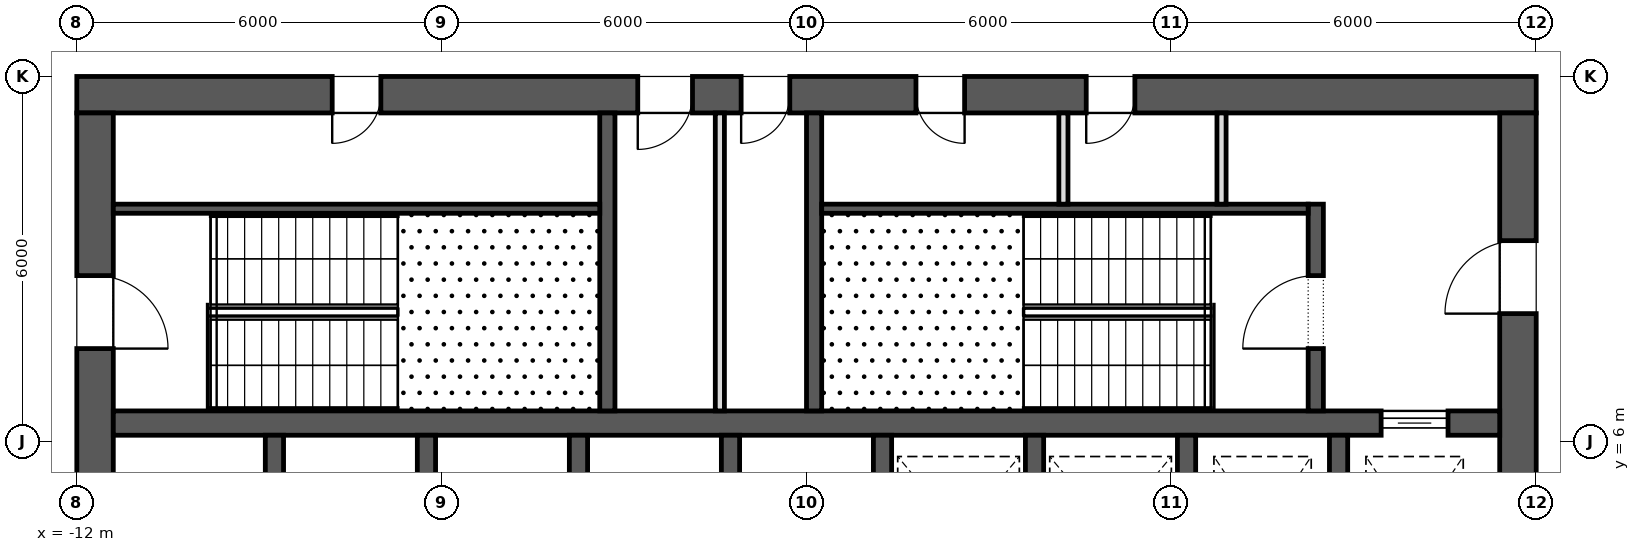
"""IFC4 building model, lengths in metres.
Left out: names, types, materials, properties, quantities, classifications, styles, units other than length and angle.
Written with IfcOpenShell. Run it as: python <this file> out.ifc"""

import sys

from ifc_helpers import new_model, si_unit, direction, frame, frame_2d, origin, place, context, subcontext, project, spatial, rectangle, extrude, element, fill, save


model = new_model("IFC4")
c1 = context("Model", 3, precision=1e-05, world=origin(), true_north=direction((0.0, 1.0)))
c2 = subcontext(c1, "Body", "Model", "MODEL_VIEW")
j1 = project(units=[si_unit("LENGTHUNIT", "METRE"), si_unit("PLANEANGLEUNIT", "RADIAN")], contexts=[c1])
p1 = place(None, origin())
s1 = spatial("IfcSite", under=j1, at=p1, CompositionType="ELEMENT")
p2 = place(p1, origin())
s2 = spatial("IfcBuilding", under=s1, at=p2, CompositionType="ELEMENT")
p3 = place(p2, frame((0.0, 0.0, 61.3)))
s3 = spatial("IfcBuildingStorey", under=s2, at=p3, CompositionType="ELEMENT", Elevation=61.3)
p4 = place(p3, frame((-12.0, 11.7, 0.0), z_axis=(0.0, 0.0, 1.0), x_axis=(1.0, 0.0, 0.0)))
e1 = element("IfcWall", 1, at=p4, inside=s3, PredefinedType="SHEAR", context=c2, shape_type="SweptSolid", body=[
    extrude(rectangle(XDim=24.0, YDim=0.6, at=frame_2d((12.0, 0.0))), origin(), (0.0, 0.0, 1.0), 4.2),
])
p5 = place(p4, frame((9.225, 0.0, 0.0)))
e2 = element("IfcOpeningElement", 2, at=p5, cuts=e1, PredefinedType="OPENING", context=c2, shape_type="SweptSolid", body=[
    extrude(rectangle(XDim=0.9, YDim=2.1, at=frame_2d((0.45, 1.05))), frame((0.0, 0.312, 0.0), z_axis=(0.0, -1.0, 0.0), x_axis=(1.0, 0.0, 0.0)), (0.0, 0.0, 1.0), 0.624),
])
p6 = place(p4, frame((10.925, 0.0, 0.0)))
e3 = element("IfcOpeningElement", 3, at=p6, cuts=e1, PredefinedType="OPENING", context=c2, shape_type="SweptSolid", body=[
    extrude(rectangle(XDim=0.8, YDim=2.1, at=frame_2d((0.4, 1.05))), frame((0.0, 0.312, 0.0), z_axis=(0.0, -1.0, 0.0), x_axis=(1.0, 0.0, 0.0)), (0.0, 0.0, 1.0), 0.624),
])
p7 = place(p4, frame((4.2, 0.0, 0.0)))
e4 = element("IfcOpeningElement", 4, at=p7, cuts=e1, PredefinedType="OPENING", context=c2, shape_type="SweptSolid", body=[
    extrude(rectangle(XDim=0.8, YDim=2.1, at=frame_2d((0.4, 1.05))), frame((0.0, 0.312, 0.0), z_axis=(0.0, -1.0, 0.0), x_axis=(1.0, 0.0, 0.0)), (0.0, 0.0, 1.0), 0.624),
])
p8 = place(p4, frame((13.8, 0.0, 0.0)))
e5 = element("IfcOpeningElement", 5, at=p8, cuts=e1, PredefinedType="OPENING", context=c2, shape_type="SweptSolid", body=[
    extrude(rectangle(XDim=0.8, YDim=2.1, at=frame_2d((0.4, 1.05))), frame((0.0, 0.312, 0.0), z_axis=(0.0, -1.0, 0.0), x_axis=(1.0, 0.0, 0.0)), (0.0, 0.0, 1.0), 0.624),
])
p9 = place(p4, frame((16.6, 0.0, 0.0)))
e6 = element("IfcOpeningElement", 6, at=p9, cuts=e1, PredefinedType="OPENING", context=c2, shape_type="SweptSolid", body=[
    extrude(rectangle(XDim=0.8, YDim=2.1, at=frame_2d((0.4, 1.05))), frame((0.0, 0.312, 0.0), z_axis=(0.0, -1.0, 0.0), x_axis=(1.0, 0.0, 0.0)), (0.0, 0.0, 1.0), 0.624),
])
p10 = place(p3, frame((11.7, -11.4, 0.0), z_axis=(0.0, 0.0, 1.0), x_axis=(0.0, 1.0, 0.0)))
e7 = element("IfcWall", 7, at=p10, inside=s3, PredefinedType="SHEAR", context=c2, shape_type="SweptSolid", body=[
    extrude(rectangle(XDim=22.8, YDim=0.6, at=frame_2d((11.4, 0.0))), origin(), (0.0, 0.0, 1.0), 4.2),
])
p11 = place(p10, frame((10.2, 0.0, 0.0)))
e8 = element("IfcOpeningElement", 8, at=p11, cuts=e7, PredefinedType="OPENING", context=c2, shape_type="SweptSolid", body=[
    extrude(rectangle(XDim=2.4, YDim=2.1, at=frame_2d((1.2, 1.05))), frame((0.0, 0.312, 0.0), z_axis=(0.0, -1.0, 0.0), x_axis=(1.0, 0.0, 0.0)), (0.0, 0.0, 1.0), 0.624),
])
p12 = place(p10, frame((19.5, 0.0, 0.0)))
e9 = element("IfcOpeningElement", 9, at=p12, cuts=e7, PredefinedType="OPENING", context=c2, shape_type="SweptSolid", body=[
    extrude(rectangle(XDim=1.2, YDim=2.1, at=frame_2d((0.6, 1.05))), frame((0.0, 0.312, 0.0), z_axis=(0.0, -1.0, 0.0), x_axis=(1.0, 0.0, 0.0)), (0.0, 0.0, 1.0), 0.624),
])
p13 = place(p10, frame((2.1, 0.0, 0.0)))
e10 = element("IfcOpeningElement", 10, at=p13, cuts=e7, PredefinedType="OPENING", context=c2, shape_type="SweptSolid", body=[
    extrude(rectangle(XDim=1.2, YDim=2.1, at=frame_2d((0.6, 1.05))), frame((0.0, 0.312, 0.0), z_axis=(0.0, -1.0, 0.0), x_axis=(1.0, 0.0, 0.0)), (0.0, 0.0, 1.0), 0.624),
])
p14 = place(p3, frame((-11.7, -11.4, 0.0), z_axis=(0.0, 0.0, 1.0), x_axis=(0.0, 1.0, 0.0)))
e11 = element("IfcWall", 11, at=p14, inside=s3, PredefinedType="SHEAR", context=c2, shape_type="SweptSolid", body=[
    extrude(rectangle(XDim=22.8, YDim=0.6, at=frame_2d((11.4, 0.0))), origin(), (0.0, 0.0, 1.0), 4.2),
])
p15 = place(p14, frame((10.2, 0.0, 0.0)))
e12 = element("IfcOpeningElement", 12, at=p15, cuts=e11, PredefinedType="OPENING", context=c2, shape_type="SweptSolid", body=[
    extrude(rectangle(XDim=2.4, YDim=2.1, at=frame_2d((1.2, 1.05))), frame((0.0, 0.312, 0.0), z_axis=(0.0, -1.0, 0.0), x_axis=(1.0, 0.0, 0.0)), (0.0, 0.0, 1.0), 0.624),
])
p16 = place(p14, frame((18.925, 0.0, 0.0)))
e13 = element("IfcOpeningElement", 13, at=p16, cuts=e11, PredefinedType="OPENING", context=c2, shape_type="SweptSolid", body=[
    extrude(rectangle(XDim=1.2, YDim=2.1, at=frame_2d((0.6, 1.05))), frame((0.0, 0.312, 0.0), z_axis=(0.0, -1.0, 0.0), x_axis=(1.0, 0.0, 0.0)), (0.0, 0.0, 1.0), 0.624),
])
p17 = place(p14, frame((2.675, 0.0, 0.0)))
e14 = element("IfcOpeningElement", 14, at=p17, cuts=e11, PredefinedType="OPENING", context=c2, shape_type="SweptSolid", body=[
    extrude(rectangle(XDim=1.2, YDim=2.1, at=frame_2d((0.6, 1.05))), frame((0.0, 0.312, 0.0), z_axis=(0.0, -1.0, 0.0), x_axis=(1.0, 0.0, 0.0)), (0.0, 0.0, 1.0), 0.624),
])
p18 = place(p3, frame((-11.4, 6.3, 0.0), z_axis=(0.0, 0.0, 1.0), x_axis=(1.0, 0.0, 0.0)))
e15 = element("IfcWall", 15, at=p18, inside=s3, PredefinedType="SHEAR", context=c2, shape_type="SweptSolid", body=[
    extrude(rectangle(XDim=22.8, YDim=0.4, at=frame_2d((11.4, 0.0))), origin(), (0.0, 0.0, 1.0), 4.2),
])
p19 = place(p18, frame((20.85, 0.0, 0.0)))
e16 = element("IfcOpeningElement", 16, at=p19, cuts=e15, PredefinedType="OPENING", context=c2, shape_type="SweptSolid", body=[
    extrude(rectangle(XDim=1.1, YDim=2.1, at=frame_2d((0.55, 1.05))), frame((0.0, 0.212, 0.0), z_axis=(0.0, -1.0, 0.0), x_axis=(1.0, 0.0, 0.0)), (0.0, 0.0, 1.0), 0.424),
])
for number, where, z_axis, x_axis in (
    (17, (-8.75, 3.2, 0.0), (0.0, 0.0, 1.0), (0.0, 1.0, 0.0)),
    (18, (-6.25, 3.2, 0.0), (0.0, 0.0, 1.0), (0.0, 1.0, 0.0)),
    (19, (-3.75, 3.2, 0.0), (0.0, 0.0, 1.0), (0.0, 1.0, 0.0)),
    (20, (-1.25, 3.2, 0.0), (0.0, 0.0, 1.0), (0.0, 1.0, 0.0)),
    (21, (1.25, 3.2, 0.0), (0.0, 0.0, 1.0), (0.0, 1.0, 0.0)),
    (22, (3.75, 3.2, 0.0), (0.0, 0.0, 1.0), (0.0, 1.0, 0.0)),
    (23, (6.25, 3.2, 0.0), (0.0, 0.0, 1.0), (0.0, 1.0, 0.0)),
    (24, (8.75, 3.2, 0.0), (0.0, 0.0, 1.0), (0.0, 1.0, 0.0)),
):
    element("IfcWall", number, at=place(p3, frame(where, z_axis=z_axis, x_axis=x_axis)), inside=s3, PredefinedType="SHEAR", context=c2, shape_type="SweptSolid", body=[
        extrude(rectangle(XDim=2.9, YDim=0.3, at=frame_2d((1.45, 0.0))), origin(), (0.0, 0.0, 1.0), 4.2),
    ])
for number, where, z_axis, x_axis in (
    (25, (-3.275, 6.5, 0.0), (0.0, 0.0, 1.0), (0.0, 1.0, 0.0)),
    (26, (0.125, 6.5, 0.0), (0.0, 0.0, 1.0), (0.0, 1.0, 0.0)),
):
    element("IfcWall", number, at=place(p3, frame(where, z_axis=z_axis, x_axis=x_axis)), inside=s3, PredefinedType="SHEAR", context=c2, shape_type="SweptSolid", body=[
        extrude(rectangle(XDim=4.9, YDim=0.25, at=frame_2d((2.45, 0.0))), origin(), (0.0, 0.0, 1.0), 3.9),
    ])
p20 = place(p3, frame((8.375, 6.5, 0.0), z_axis=(0.0, 0.0, 1.0), x_axis=(0.0, 1.0, 0.0)))
e27 = element("IfcWall", 27, at=p20, inside=s3, PredefinedType="SHEAR", context=c2, shape_type="SweptSolid", body=[
    extrude(rectangle(XDim=3.4, YDim=0.25, at=frame_2d((1.7, 0.0))), origin(), (0.0, 0.0, 1.0), 3.9),
])
p21 = place(p20, frame((1.025, 0.0, 0.0)))
e28 = element("IfcOpeningElement", 28, at=p21, cuts=e27, PredefinedType="OPENING", context=c2, shape_type="SweptSolid", body=[
    extrude(rectangle(XDim=1.2, YDim=2.1, at=frame_2d((0.6, 1.05))), frame((0.0, 0.137, 0.0), z_axis=(0.0, -1.0, 0.0), x_axis=(1.0, 0.0, 0.0)), (0.0, 0.0, 1.0), 0.274),
])
for number, where, z_axis, x_axis in (
    (29, (-11.4, 9.825, 0.0), (0.0, 0.0, 1.0), (1.0, 0.0, 0.0)),
    (30, (0.25, 9.825, 0.0), (0.0, 0.0, 1.0), (1.0, 0.0, 0.0)),
):
    element("IfcWall", number, at=place(p3, frame(where, z_axis=z_axis, x_axis=x_axis)), inside=s3, PredefinedType="SHEAR", context=c2, shape_type="SweptSolid", body=[
        extrude(rectangle(XDim=8.0, YDim=0.15, at=frame_2d((4.0, 0.0))), origin(), (0.0, 0.0, 1.0), 3.9),
    ])
p22 = place(p3, frame((-1.425, 6.5, 0.0), z_axis=(0.0, 0.0, 1.0), x_axis=(0.0, 1.0, 0.0)))
e31 = element("IfcWall", 31, at=p22, inside=s3, PredefinedType="PARTITIONING", context=c2, shape_type="SweptSolid", body=[
    extrude(rectangle(XDim=4.9, YDim=0.15, at=frame_2d((2.45, 0.0))), origin(), (0.0, 0.0, 1.0), 3.9),
])
for number, where, z_axis, x_axis in (
    (32, (4.225, 9.9, 0.0), (0.0, 0.0, 1.0), (0.0, 1.0, 0.0)),
    (33, (6.825, 9.9, 0.0), (0.0, 0.0, 1.0), (0.0, 1.0, 0.0)),
):
    element("IfcWall", number, at=place(p3, frame(where, z_axis=z_axis, x_axis=x_axis)), inside=s3, PredefinedType="PARTITIONING", context=c2, shape_type="SweptSolid", body=[
        extrude(rectangle(XDim=1.5, YDim=0.15, at=frame_2d((0.75, 0.0))), origin(), (0.0, 0.0, 1.0), 3.9),
    ])
p23 = place(p19, origin())
e34 = element("IfcDoor", 34, at=p23, inside=s3, OperationType="SLIDING_TO_LEFT", PredefinedType="DOOR", context=c2, shape_type="SweptSolid", body=[
    extrude(rectangle(XDim=1.1, YDim=2.1, at=frame_2d((0.55, 1.05))), frame((0.0, 0.025, 0.0), z_axis=(0.0, -1.0, 0.0), x_axis=(1.0, 0.0, 0.0)), (0.0, 0.0, 1.0), 0.05),
])
fill(e16, e34)
p24 = place(p16, frame((1.2, 0.0, 0.0), z_axis=(0.0, 0.0, 1.0), x_axis=(-1.0, 0.0, 0.0)))
e35 = element("IfcDoor", 35, at=p24, inside=s3, OperationType="SINGLE_SWING_LEFT", PredefinedType="DOOR", context=c2, shape_type="SweptSolid", body=[
    extrude(rectangle(XDim=1.2, YDim=2.1, at=frame_2d((0.6, 1.05))), frame((0.0, 0.025, 0.0), z_axis=(0.0, -1.0, 0.0), x_axis=(1.0, 0.0, 0.0)), (0.0, 0.0, 1.0), 0.05),
])
fill(e13, e35)
p25 = place(p21, origin())
e36 = element("IfcDoor", 36, at=p25, inside=s3, OperationType="SINGLE_SWING_RIGHT", PredefinedType="DOOR", context=c2, shape_type="SweptSolid", body=[
    extrude(rectangle(XDim=1.2, YDim=2.1, at=frame_2d((0.6, 1.05))), frame((0.0, 0.025, 0.0), z_axis=(0.0, -1.0, 0.0), x_axis=(1.0, 0.0, 0.0)), (0.0, 0.0, 1.0), 0.05),
])
fill(e28, e36)
p26 = place(p12, origin())
e37 = element("IfcDoor", 37, at=p26, inside=s3, OperationType="SINGLE_SWING_RIGHT", PredefinedType="DOOR", context=c2, shape_type="SweptSolid", body=[
    extrude(rectangle(XDim=1.2, YDim=2.1, at=frame_2d((0.6, 1.05))), frame((0.0, 0.025, 0.0), z_axis=(0.0, -1.0, 0.0), x_axis=(1.0, 0.0, 0.0)), (0.0, 0.0, 1.0), 0.05),
])
fill(e9, e37)
p27 = place(p5, frame((0.9, 0.0, 0.0), z_axis=(0.0, 0.0, 1.0), x_axis=(-1.0, 0.0, 0.0)))
e38 = element("IfcDoor", 38, at=p27, inside=s3, OperationType="SINGLE_SWING_LEFT", PredefinedType="DOOR", context=c2, shape_type="SweptSolid", body=[
    extrude(rectangle(XDim=0.9, YDim=2.1, at=frame_2d((0.45, 1.05))), frame((0.0, 0.025, 0.0), z_axis=(0.0, -1.0, 0.0), x_axis=(1.0, 0.0, 0.0)), (0.0, 0.0, 1.0), 0.05),
])
fill(e2, e38)
p28 = place(p6, frame((0.8, 0.0, 0.0), z_axis=(0.0, 0.0, 1.0), x_axis=(-1.0, 0.0, 0.0)))
e39 = element("IfcDoor", 39, at=p28, inside=s3, OperationType="SINGLE_SWING_LEFT", PredefinedType="DOOR", context=c2, shape_type="SweptSolid", body=[
    extrude(rectangle(XDim=0.8, YDim=2.1, at=frame_2d((0.4, 1.05))), frame((0.0, 0.025, 0.0), z_axis=(0.0, -1.0, 0.0), x_axis=(1.0, 0.0, 0.0)), (0.0, 0.0, 1.0), 0.05),
])
fill(e3, e39)
p29 = place(p7, frame((0.8, 0.0, 0.0), z_axis=(0.0, 0.0, 1.0), x_axis=(-1.0, 0.0, 0.0)))
e40 = element("IfcDoor", 40, at=p29, inside=s3, OperationType="SINGLE_SWING_LEFT", PredefinedType="DOOR", context=c2, shape_type="SweptSolid", body=[
    extrude(rectangle(XDim=0.8, YDim=2.1, at=frame_2d((0.4, 1.05))), frame((0.0, 0.025, 0.0), z_axis=(0.0, -1.0, 0.0), x_axis=(1.0, 0.0, 0.0)), (0.0, 0.0, 1.0), 0.05),
])
fill(e4, e40)
p30 = place(p8, frame((0.8, 0.0, 0.0), z_axis=(0.0, 0.0, 1.0), x_axis=(-1.0, 0.0, 0.0)))
e41 = element("IfcDoor", 41, at=p30, inside=s3, OperationType="SINGLE_SWING_RIGHT", PredefinedType="DOOR", context=c2, shape_type="SweptSolid", body=[
    extrude(rectangle(XDim=0.8, YDim=2.1, at=frame_2d((0.4, 1.05))), frame((0.0, 0.025, 0.0), z_axis=(0.0, -1.0, 0.0), x_axis=(1.0, 0.0, 0.0)), (0.0, 0.0, 1.0), 0.05),
])
fill(e5, e41)
p31 = place(p9, frame((0.8, 0.0, 0.0), z_axis=(0.0, 0.0, 1.0), x_axis=(-1.0, 0.0, 0.0)))
e42 = element("IfcDoor", 42, at=p31, inside=s3, OperationType="SINGLE_SWING_LEFT", PredefinedType="DOOR", context=c2, shape_type="SweptSolid", body=[
    extrude(rectangle(XDim=0.8, YDim=2.1, at=frame_2d((0.4, 1.05))), frame((0.0, 0.025, 0.0), z_axis=(0.0, -1.0, 0.0), x_axis=(1.0, 0.0, 0.0)), (0.0, 0.0, 1.0), 0.05),
])
fill(e6, e42)
save(model, sys.argv[1])
